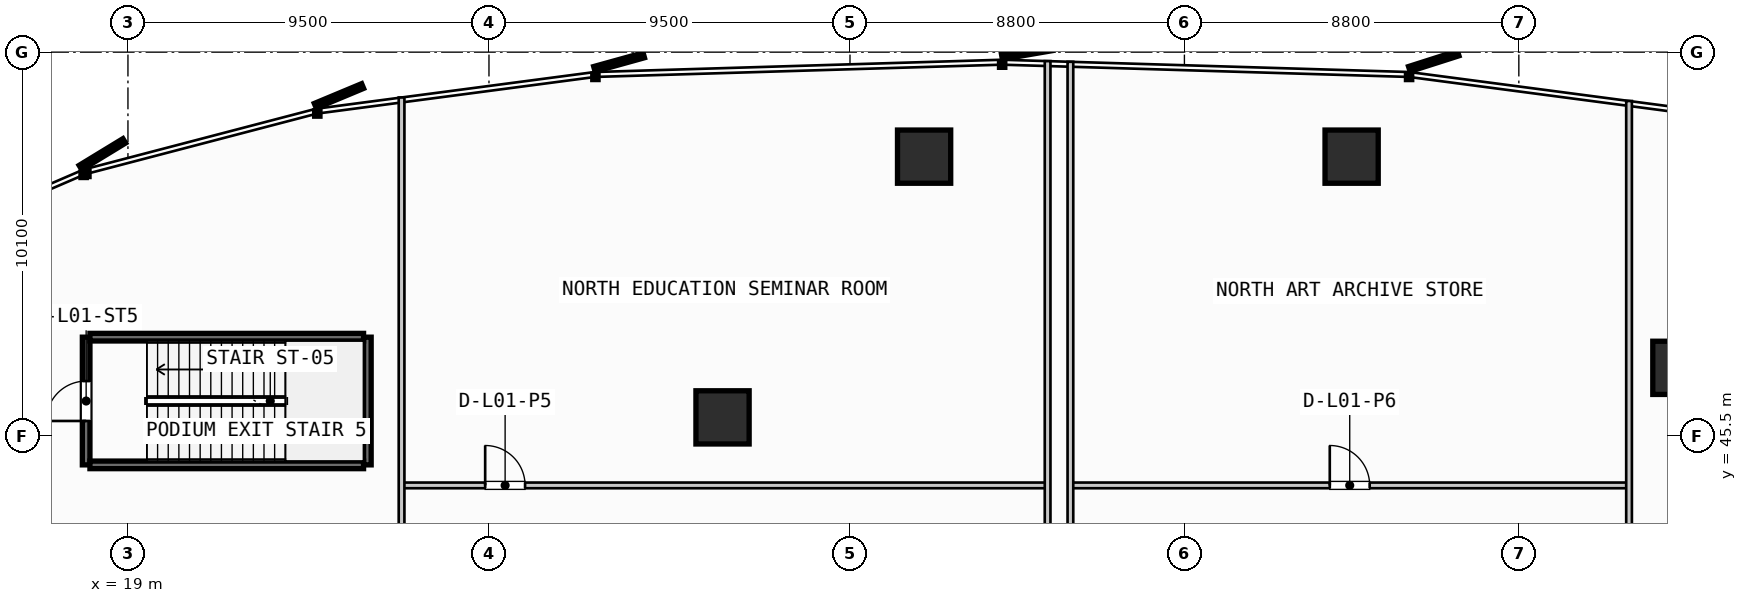
"""IFC4 building model, lengths in metres.
Left out: names, types, materials, properties, quantities, classifications, styles, units other than length and angle.
Written with IfcOpenShell. Run it as: python <this file> out.ifc"""

import sys

from ifc_helpers import new_model, si_unit, direction, frame, frame_2d, origin, origin_2d, place, context, subcontext, project, spatial, rectangle, hollow_rectangle, extrude, source, transform, mapped, element, fill, save


model = new_model("IFC4")
c1 = context("Model", 3, precision=1e-05, world=origin(), true_north=direction((0.0, 1.0)))
c2 = subcontext(c1, "Body", "Model", "MODEL_VIEW")
j1 = project(units=[si_unit("LENGTHUNIT", "METRE"), si_unit("PLANEANGLEUNIT", "RADIAN")], contexts=[c1])
p1 = place(None, origin())
s1 = spatial("IfcSite", under=j1, at=p1, CompositionType="ELEMENT")
p2 = place(p1, origin())
s2 = spatial("IfcBuilding", under=s1, at=p2, CompositionType="ELEMENT")
p3 = place(p2, frame((0.0, 0.0, 5.2)))
s3 = spatial("IfcBuildingStorey", under=s2, at=p3, CompositionType="ELEMENT", Elevation=5.2)
m1 = source(origin(), c2, "Body", "SweptSolid", [
    extrude(hollow_rectangle(XDim=1.4, YDim=1.4, WallThickness=0.05, InnerFilletRadius=0.025, OuterFilletRadius=0.075, at=origin_2d()), origin(), (0.0, 0.0, 1.0), 4.55),
])
for number, where, z_axis, x_axis in (
    (1, (59.825, 47.293, 0.0), (0.0, 0.0, 1.0), (1.0, 0.0, 0.0)),
    (2, (51.2, 52.85, 0.0), (0.0, 0.0, 1.0), (1.0, 0.0, 0.0)),
    (3, (39.95, 52.85, 0.0), (0.0, 0.0, 1.0), (1.0, 0.0, 0.0)),
    (4, (34.646, 45.99, 0.0), (0.0, 0.0, 1.0), (1.0, 0.0, 0.0)),
):
    element("IfcColumn", number, at=place(p3, frame(where, z_axis=z_axis, x_axis=x_axis)), inside=s3, PredefinedType="COLUMN", context=c2, shape_type="MappedRepresentation", body=[
        mapped(m1, transform((0.0, 0.0, 0.0), scale=1.0)),
    ])
p4 = place(p3, frame((17.9, 44.74, 0.0), z_axis=(0.0, 0.0, 1.0), x_axis=(0.0, 1.0, 0.0)))
e5 = element("IfcWall", 5, at=p4, inside=s3, PredefinedType="SHEAR", context=c2, shape_type="SweptSolid", body=[
    extrude(rectangle(XDim=3.36, YDim=0.2, at=frame_2d((1.68, 0.0))), origin(), (0.0, 0.0, 1.0), 4.55),
])
p5 = place(p4, frame((1.155, 0.0, 0.0)))
e6 = element("IfcOpeningElement", 6, at=p5, cuts=e5, PredefinedType="OPENING", context=c2, shape_type="SweptSolid", body=[
    extrude(rectangle(XDim=1.05, YDim=2.15, at=frame_2d((0.525, 1.075))), frame((0.0, 0.11, 0.0), z_axis=(0.0, -1.0, 0.0), x_axis=(1.0, 0.0, 0.0)), (0.0, 0.0, 1.0), 0.22),
])
p6 = place(p3, frame((25.3, 48.1, 0.0), z_axis=(0.0, 0.0, 1.0), x_axis=(0.0, -1.0, 0.0)))
e7 = element("IfcWall", 7, at=p6, inside=s3, PredefinedType="SHEAR", context=c2, shape_type="SweptSolid", body=[
    extrude(rectangle(XDim=3.36, YDim=0.2, at=frame_2d((1.68, 0.0))), origin(), (0.0, 0.0, 1.0), 4.55),
])
for number, where, z_axis, x_axis in (
    (8, (25.2, 44.74, 0.0), (0.0, 0.0, 1.0), (-1.0, 0.0, 0.0)),
    (9, (18.0, 48.1, 0.0), (0.0, 0.0, 1.0), (1.0, 0.0, 0.0)),
):
    element("IfcWall", number, at=place(p3, frame(where, z_axis=z_axis, x_axis=x_axis)), inside=s3, PredefinedType="SHEAR", context=c2, shape_type="SweptSolid", body=[
        extrude(rectangle(XDim=7.2, YDim=0.2, at=frame_2d((3.6, 0.0))), origin(), (0.0, 0.0, 1.0), 4.55),
    ])
p7 = place(p3, frame((26.2, 44.2, 0.0), z_axis=(0.0, 0.0, 1.0), x_axis=(1.0, 0.0, 0.0)))
e10 = element("IfcWall", 10, at=p7, inside=s3, PredefinedType="PARTITIONING", context=c2, shape_type="SweptSolid", body=[
    extrude(rectangle(XDim=17.0, YDim=0.15, at=frame_2d((8.5, 0.0))), origin(), (0.0, 0.0, 1.0), 3.03),
])
p8 = place(p7, frame((2.2, 0.0, 0.0)))
e11 = element("IfcOpeningElement", 11, at=p8, cuts=e10, PredefinedType="OPENING", context=c2, shape_type="SweptSolid", body=[
    extrude(rectangle(XDim=1.05, YDim=2.15, at=frame_2d((0.525, 1.075))), frame((0.0, 0.085, 0.0), z_axis=(0.0, -1.0, 0.0), x_axis=(1.0, 0.0, 0.0)), (0.0, 0.0, 1.0), 0.17),
])
p9 = place(p3, frame((26.2, 42.2, 0.0), z_axis=(0.0, 0.0, 1.0), x_axis=(0.0, 1.0, 0.0)))
e12 = element("IfcWall", 12, at=p9, inside=s3, PredefinedType="PARTITIONING", context=c2, shape_type="SweptSolid", body=[
    extrude(rectangle(XDim=12.207, YDim=0.15, at=frame_2d((6.104, 0.0))), origin(), (0.0, 0.0, 1.0), 3.763),
])
p10 = place(p3, frame((43.2, 42.2, 0.0), z_axis=(0.0, 0.0, 1.0), x_axis=(0.0, 1.0, 0.0)))
e13 = element("IfcWall", 13, at=p10, inside=s3, PredefinedType="PARTITIONING", context=c2, shape_type="SweptSolid", body=[
    extrude(rectangle(XDim=13.164, YDim=0.15, at=frame_2d((6.582, 0.0))), origin(), (0.0, 0.0, 1.0), 3.03),
])
p11 = place(p3, frame((43.8, 44.2, 0.0), z_axis=(0.0, 0.0, 1.0), x_axis=(1.0, 0.0, 0.0)))
e14 = element("IfcWall", 14, at=p11, inside=s3, PredefinedType="PARTITIONING", context=c2, shape_type="SweptSolid", body=[
    extrude(rectangle(XDim=14.7, YDim=0.15, at=frame_2d((7.35, 0.0))), origin(), (0.0, 0.0, 1.0), 3.763),
])
p12 = place(p11, frame((6.825, 0.0, 0.0)))
e15 = element("IfcOpeningElement", 15, at=p12, cuts=e14, PredefinedType="OPENING", context=c2, shape_type="SweptSolid", body=[
    extrude(rectangle(XDim=1.05, YDim=2.15, at=frame_2d((0.525, 1.075))), frame((0.0, 0.085, 0.0), z_axis=(0.0, -1.0, 0.0), x_axis=(1.0, 0.0, 0.0)), (0.0, 0.0, 1.0), 0.17),
])
p13 = place(p3, frame((43.8, 42.2, 0.0), z_axis=(0.0, 0.0, 1.0), x_axis=(0.0, 1.0, 0.0)))
e16 = element("IfcWall", 16, at=p13, inside=s3, PredefinedType="PARTITIONING", context=c2, shape_type="SweptSolid", body=[
    extrude(rectangle(XDim=13.146, YDim=0.15, at=frame_2d((6.573, 0.0))), origin(), (0.0, 0.0, 1.0), 3.03),
])
p14 = place(p3, frame((58.5, 42.2, 0.0), z_axis=(0.0, 0.0, 1.0), x_axis=(0.0, 1.0, 0.0)))
e17 = element("IfcWall", 17, at=p14, inside=s3, PredefinedType="PARTITIONING", context=c2, shape_type="SweptSolid", body=[
    extrude(rectangle(XDim=12.115, YDim=0.15, at=frame_2d((6.057, 0.0))), origin(), (0.0, 0.0, 1.0), 3.03),
])
m2 = source(origin(), c2, "Body", "SweptSolid", [
    extrude(rectangle(XDim=1.05, YDim=2.15, at=frame_2d((0.525, 1.075))), frame((0.0, 0.025, 0.0), z_axis=(0.0, -1.0, 0.0), x_axis=(1.0, 0.0, 0.0)), (0.0, 0.0, 1.0), 0.05),
])
p15 = place(p5, origin())
e18 = element("IfcDoor", 18, at=p15, inside=s3, OperationType="SINGLE_SWING_LEFT", PredefinedType="DOOR", context=c2, shape_type="MappedRepresentation", body=[
    mapped(m2, transform((0.0, 0.0, 0.0), scale=1.0)),
])
fill(e6, e18)
p16 = place(p8, origin())
e19 = element("IfcDoor", 19, at=p16, inside=s3, OperationType="SINGLE_SWING_LEFT", PredefinedType="DOOR", context=c2, shape_type="MappedRepresentation", body=[
    mapped(m2, transform((0.0, 0.0, 0.0), scale=1.0)),
])
fill(e11, e19)
p17 = place(p12, origin())
e20 = element("IfcDoor", 20, at=p17, inside=s3, OperationType="SINGLE_SWING_LEFT", PredefinedType="DOOR", context=c2, shape_type="MappedRepresentation", body=[
    mapped(m2, transform((0.0, 0.0, 0.0), scale=1.0)),
])
fill(e15, e20)
save(model, sys.argv[1])
